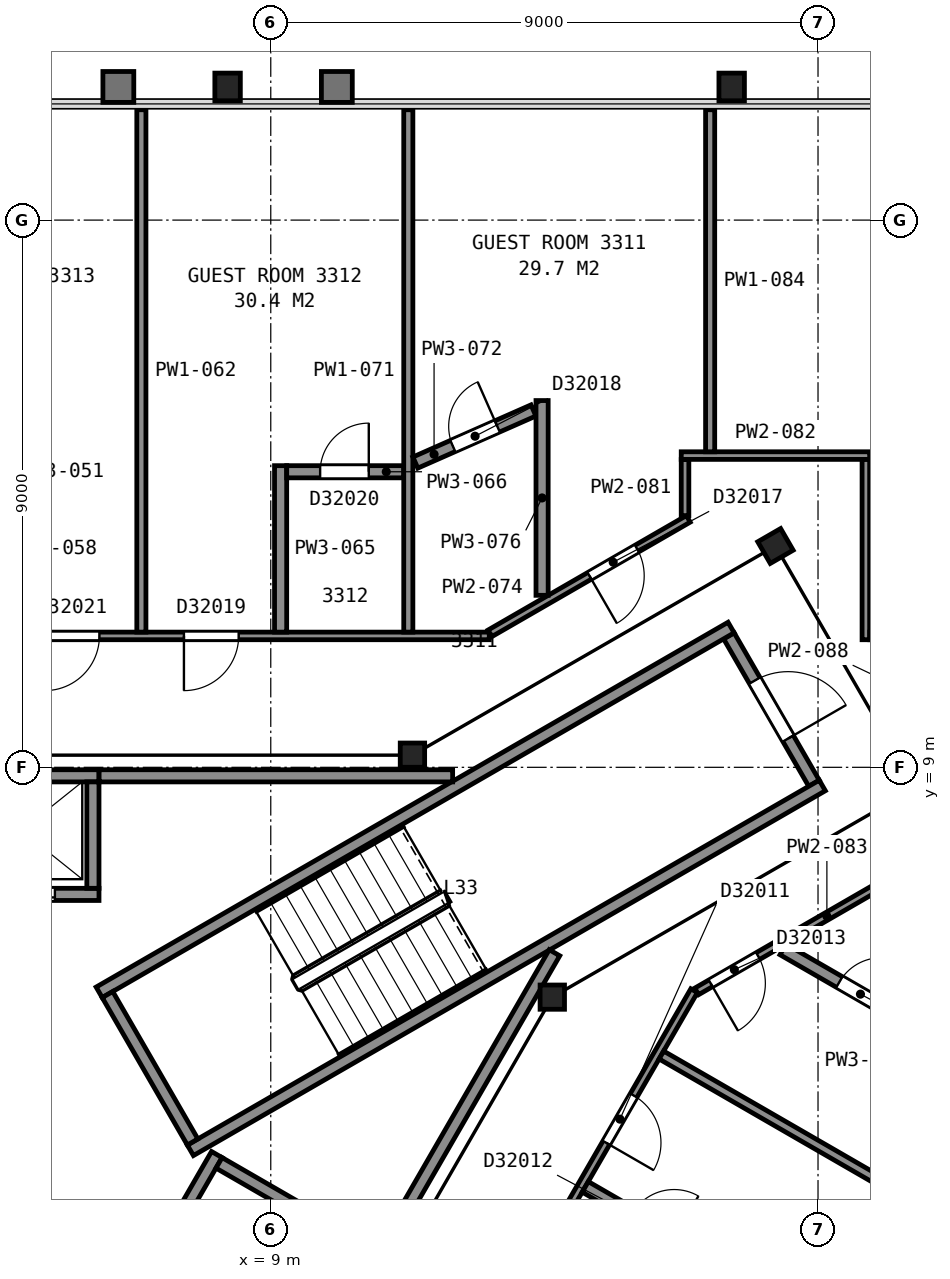
"""IFC4 building model, lengths in metres.
Left out: names, types, materials, properties, quantities, classifications, styles, units other than length and angle.
Written with IfcOpenShell. Run it as: python <this file> out.ifc"""

import sys

from ifc_helpers import new_model, si_unit, direction, frame, frame_2d, origin, origin_2d, place, context, subcontext, project, spatial, rectangle, i_section, extrude, element, fill, save


model = new_model("IFC4")
c1 = context("Model", 3, precision=1e-05, world=origin(), true_north=direction((0.0, 1.0)))
c2 = subcontext(c1, "Body", "Model", "MODEL_VIEW")
j1 = project(units=[si_unit("LENGTHUNIT", "METRE"), si_unit("PLANEANGLEUNIT", "RADIAN")], contexts=[c1])
p1 = place(None, origin())
s1 = spatial("IfcSite", under=j1, at=p1, CompositionType="ELEMENT")
p2 = place(p1, origin())
s2 = spatial("IfcBuilding", under=s1, at=p2, CompositionType="ELEMENT")
p3 = place(p2, frame((0.0, 0.0, 136.0)))
s3 = spatial("IfcBuildingStorey", under=s2, at=p3, CompositionType="ELEMENT", Elevation=136.0)
for number, where, z_axis, x_axis in (
    (1, (16.58, 20.19, 0.0), (0.0, 0.0, 1.0), (1.0, 0.0, 0.0)),
    (2, (8.29, 20.19, 0.0), (0.0, 0.0, 1.0), (1.0, 0.0, 0.0)),
):
    element("IfcColumn", number, at=place(p3, frame(where, z_axis=z_axis, x_axis=x_axis)), inside=s3, PredefinedType="COLUMN", context=c2, shape_type="SweptSolid", body=[
        extrude(i_section(OverallWidth=0.419, OverallDepth=0.455, WebThickness=0.042, FlangeThickness=0.068, FilletRadius=0.015, at=origin_2d()), origin(), (0.0, 0.0, 1.0), 3.6),
    ])
p4 = place(p3, frame((13.63, 5.22, 0.0), z_axis=(0.0, 0.0, 1.0), x_axis=(1.0, 0.0, 0.0)))
e3 = element("IfcColumn", 3, at=p4, inside=s3, PredefinedType="COLUMN", context=c2, shape_type="SweptSolid", body=[
    extrude(i_section(OverallWidth=0.401, OverallDepth=0.399, WebThickness=0.025, FlangeThickness=0.04, FilletRadius=0.015, at=origin_2d()), origin(), (0.0, 0.0, 1.0), 3.6),
])
p5 = place(p3, frame((17.3, 12.64, 0.0), z_axis=(0.0, 0.0, 1.0), x_axis=(0.5, -0.866025403784, 0.0)))
e4 = element("IfcColumn", 4, at=p5, inside=s3, PredefinedType="COLUMN", context=c2, shape_type="SweptSolid", body=[
    extrude(i_section(OverallWidth=0.411, OverallDepth=0.434, WebThickness=0.036, FlangeThickness=0.057, FilletRadius=0.015, at=origin_2d()), origin(), (0.0, 0.0, 1.0), 3.6),
])
p6 = place(p3, frame((11.33, 9.2, 0.0), z_axis=(0.0, 0.0, 1.0), x_axis=(1.0, 0.0, 0.0)))
e5 = element("IfcColumn", 5, at=p6, inside=s3, PredefinedType="COLUMN", context=c2, shape_type="SweptSolid", body=[
    extrude(i_section(OverallWidth=0.401, OverallDepth=0.399, WebThickness=0.025, FlangeThickness=0.04, FilletRadius=0.015, at=origin_2d()), origin(), (0.0, 0.0, 1.0), 3.6),
])
p7 = place(p3, frame((17.934, 8.738, 0.0), z_axis=(0.0, 0.0, 1.0), x_axis=(-0.49998411664, 0.866034573852, 0.0)))
e6 = element("IfcWall", 6, at=p7, inside=s3, PredefinedType="PARTITIONING", context=c2, shape_type="SweptSolid", body=[
    extrude(rectangle(XDim=2.8, YDim=0.2, at=frame_2d((1.4, 0.0))), origin(), (0.0, 0.0, 1.0), 3.35),
])
p8 = place(p7, frame((0.85, 0.0, 0.0)))
e7 = element("IfcOpeningElement", 7, at=p8, cuts=e6, PredefinedType="OPENING", context=c2, shape_type="SweptSolid", body=[
    extrude(rectangle(XDim=1.1, YDim=2.1, at=frame_2d((0.55, 1.05))), frame((0.0, 0.11, 0.0), z_axis=(0.0, -1.0, 0.0), x_axis=(1.0, 0.0, 0.0)), (0.0, 0.0, 1.0), 0.22),
])
for number, where, z_axis, x_axis in (
    (8, (6.178, 5.299, 0.0), (0.0, 0.0, 1.0), (0.866, 0.5, 0.0)),
    (9, (7.678, 2.701, 0.0), (0.0, 0.0, 1.0), (0.866, 0.5, 0.0)),
):
    element("IfcWall", number, at=place(p3, frame(where, z_axis=z_axis, x_axis=x_axis)), inside=s3, PredefinedType="PARTITIONING", context=c2, shape_type="SweptSolid", body=[
        extrude(rectangle(XDim=12.0, YDim=0.2, at=frame_2d((6.0, 0.0))), origin(), (0.0, 0.0, 1.0), 3.35),
    ])
p9 = place(p3, frame((7.715, 2.838, 0.0), z_axis=(0.0, 0.0, 1.0), x_axis=(-0.500049511043, 0.865996816683, 0.0)))
e10 = element("IfcWall", 10, at=p9, inside=s3, PredefinedType="PARTITIONING", context=c2, shape_type="SweptSolid", body=[
    extrude(rectangle(XDim=2.8, YDim=0.2, at=frame_2d((1.4, 0.0))), origin(), (0.0, 0.0, 1.0), 3.35),
])
p10 = place(p3, frame((3.625, 6.91, 0.0), z_axis=(0.0, 0.0, 1.0), x_axis=(1.0, 0.0, 0.0)))
e11 = element("IfcWall", 11, at=p10, inside=s3, PredefinedType="PARTITIONING", context=c2, shape_type="SweptSolid", body=[
    extrude(rectangle(XDim=2.55, YDim=0.2, at=frame_2d((1.275, 0.0))), origin(), (0.0, 0.0, 1.0), 3.6),
])
p11 = place(p10, frame((0.725, 0.0, 0.0)))
e12 = element("IfcOpeningElement", 12, at=p11, cuts=e11, PredefinedType="OPENING", context=c2, shape_type="SweptSolid", body=[
    extrude(rectangle(XDim=1.1, YDim=2.1, at=frame_2d((0.55, 1.05))), frame((0.0, 0.11, 0.0), z_axis=(0.0, -1.0, 0.0), x_axis=(1.0, 0.0, 0.0)), (0.0, 0.0, 1.0), 0.22),
])
p12 = place(p3, frame((3.625, 8.86, 0.0), z_axis=(0.0, 0.0, 1.0), x_axis=(1.0, 0.0, 0.0)))
e13 = element("IfcWall", 13, at=p12, inside=s3, PredefinedType="PARTITIONING", context=c2, shape_type="SweptSolid", body=[
    extrude(rectangle(XDim=2.55, YDim=0.2, at=frame_2d((1.275, 0.0))), origin(), (0.0, 0.0, 1.0), 3.6),
])
p13 = place(p3, frame((5.663, -1.612, 0.0), z_axis=(0.0, 0.0, 1.0), x_axis=(0.49998122708, 0.866036242063, 0.0)))
e14 = element("IfcWall", 14, at=p13, inside=s3, PredefinedType="PARTITIONING", context=c2, shape_type="SweptSolid", body=[
    extrude(rectangle(XDim=4.9, YDim=0.2, at=frame_2d((2.45, 0.0))), origin(), (0.0, 0.0, 1.0), 3.6),
])
p14 = place(p3, frame((6.075, 7.01, 0.0), z_axis=(0.0, 0.0, 1.0), x_axis=(0.0, 1.0, 0.0)))
e15 = element("IfcWall", 15, at=p14, inside=s3, PredefinedType="PARTITIONING", context=c2, shape_type="SweptSolid", body=[
    extrude(rectangle(XDim=1.75, YDim=0.2, at=frame_2d((0.875, 0.0))), origin(), (0.0, 0.0, 1.0), 3.6),
])
p15 = place(p3, frame((9.665, 1.62, 0.0), z_axis=(0.0, 0.0, 1.0), x_axis=(-0.866002029911, 0.500040482552, 0.0)))
e16 = element("IfcWall", 16, at=p15, inside=s3, PredefinedType="PARTITIONING", context=c2, shape_type="SweptSolid", body=[
    extrude(rectangle(XDim=1.75, YDim=0.2, at=frame_2d((0.875, 0.0))), origin(), (0.0, 0.0, 1.0), 3.6),
])
p16 = place(p3, frame((6.177, 8.86, 0.0), z_axis=(0.0, 0.0, 1.0), x_axis=(1.0, 0.0, 0.0)))
e17 = element("IfcWall", 17, at=p16, inside=s3, PredefinedType="PARTITIONING", context=c2, shape_type="SweptSolid", body=[
    extrude(rectangle(XDim=5.814, YDim=0.2, at=frame_2d((2.907, 0.0))), origin(), (0.0, 0.0, 1.0), 3.35),
])
p17 = place(p3, frame((8.492, -3.012, 0.0), z_axis=(0.0, 0.0, 1.0), x_axis=(0.499972957231, 0.866041016371, 0.0)))
e18 = element("IfcWall", 18, at=p17, inside=s3, PredefinedType="PARTITIONING", context=c2, shape_type="SweptSolid", body=[
    extrude(rectangle(XDim=10.349, YDim=0.2, at=frame_2d((5.174, 0.0))), origin(), (0.0, 0.0, 1.0), 3.35),
])
p18 = place(p3, frame((-12.594, 11.161, 0.0), z_axis=(0.0, 0.0, 1.0), x_axis=(1.0, 0.0, 0.0)))
e19 = element("IfcWall", 19, at=p18, inside=s3, PredefinedType="PARTITIONING", context=c2, shape_type="SweptSolid", body=[
    extrude(rectangle(XDim=25.187, YDim=0.125, at=frame_2d((12.594, 0.0))), origin(), (0.0, 0.0, 1.0), 2.613),
])
p19 = place(p18, frame((20.166, 0.0, 0.0)))
e20 = element("IfcOpeningElement", 20, at=p19, cuts=e19, PredefinedType="OPENING", context=c2, shape_type="SweptSolid", body=[
    extrude(rectangle(XDim=0.9, YDim=2.1, at=frame_2d((0.45, 1.05))), frame((0.0, 0.073, 0.0), z_axis=(0.0, -1.0, 0.0), x_axis=(1.0, 0.0, 0.0)), (0.0, 0.0, 1.0), 0.145),
])
p20 = place(p18, frame((17.875, 0.0, 0.0)))
e21 = element("IfcOpeningElement", 21, at=p20, cuts=e19, PredefinedType="OPENING", context=c2, shape_type="SweptSolid", body=[
    extrude(rectangle(XDim=0.9, YDim=2.1, at=frame_2d((0.45, 1.05))), frame((0.0, 0.073, 0.0), z_axis=(0.0, -1.0, 0.0), x_axis=(1.0, 0.0, 0.0)), (0.0, 0.0, 1.0), 0.145),
])
p21 = place(p18, frame((11.062, 0.0, 0.0)))
e22 = element("IfcOpeningElement", 22, at=p21, cuts=e19, PredefinedType="OPENING", context=c2, shape_type="SweptSolid", body=[
    extrude(rectangle(XDim=0.9, YDim=2.1, at=frame_2d((0.45, 1.05))), frame((0.0, 0.073, 0.0), z_axis=(0.0, -1.0, 0.0), x_axis=(1.0, 0.0, 0.0)), (0.0, 0.0, 1.0), 0.145),
])
p22 = place(p18, frame((8.521, 0.0, 0.0)))
e23 = element("IfcOpeningElement", 23, at=p22, cuts=e19, PredefinedType="OPENING", context=c2, shape_type="SweptSolid", body=[
    extrude(rectangle(XDim=0.9, YDim=2.1, at=frame_2d((0.45, 1.05))), frame((0.0, 0.073, 0.0), z_axis=(0.0, -1.0, 0.0), x_axis=(1.0, 0.0, 0.0)), (0.0, 0.0, 1.0), 0.145),
])
p23 = place(p18, frame((2.031, 0.0, 0.0)))
e24 = element("IfcOpeningElement", 24, at=p23, cuts=e19, PredefinedType="OPENING", context=c2, shape_type="SweptSolid", body=[
    extrude(rectangle(XDim=0.9, YDim=2.1, at=frame_2d((0.45, 1.05))), frame((0.0, 0.073, 0.0), z_axis=(0.0, -1.0, 0.0), x_axis=(1.0, 0.0, 0.0)), (0.0, 0.0, 1.0), 0.145),
])
p24 = place(p3, frame((15.962, 5.326, 0.0), z_axis=(0.0, 0.0, 1.0), x_axis=(-0.499992829944, -0.866029543379, 0.0)))
e25 = element("IfcWall", 25, at=p24, inside=s3, PredefinedType="PARTITIONING", context=c2, shape_type="SweptSolid", body=[
    extrude(rectangle(XDim=24.413, YDim=0.125, at=frame_2d((12.207, 0.0))), origin(), (0.0, 0.0, 1.0), 2.613),
])
p25 = place(p24, frame((21.258, 0.0, 0.0)))
e26 = element("IfcOpeningElement", 26, at=p25, cuts=e25, PredefinedType="OPENING", context=c2, shape_type="SweptSolid", body=[
    extrude(rectangle(XDim=0.9, YDim=2.1, at=frame_2d((0.45, 1.05))), frame((0.0, 0.073, 0.0), z_axis=(0.0, -1.0, 0.0), x_axis=(1.0, 0.0, 0.0)), (0.0, 0.0, 1.0), 0.145),
])
p26 = place(p24, frame((18.502, 0.0, 0.0)))
e27 = element("IfcOpeningElement", 27, at=p26, cuts=e25, PredefinedType="OPENING", context=c2, shape_type="SweptSolid", body=[
    extrude(rectangle(XDim=0.9, YDim=2.1, at=frame_2d((0.45, 1.05))), frame((0.0, 0.073, 0.0), z_axis=(0.0, -1.0, 0.0), x_axis=(1.0, 0.0, 0.0)), (0.0, 0.0, 1.0), 0.145),
])
p27 = place(p24, frame((11.799, 0.0, 0.0)))
e28 = element("IfcOpeningElement", 28, at=p27, cuts=e25, PredefinedType="OPENING", context=c2, shape_type="SweptSolid", body=[
    extrude(rectangle(XDim=0.9, YDim=2.1, at=frame_2d((0.45, 1.05))), frame((0.0, 0.073, 0.0), z_axis=(0.0, -1.0, 0.0), x_axis=(1.0, 0.0, 0.0)), (0.0, 0.0, 1.0), 0.145),
])
p28 = place(p24, frame((9.043, 0.0, 0.0)))
e29 = element("IfcOpeningElement", 29, at=p28, cuts=e25, PredefinedType="OPENING", context=c2, shape_type="SweptSolid", body=[
    extrude(rectangle(XDim=0.9, YDim=2.1, at=frame_2d((0.45, 1.05))), frame((0.0, 0.073, 0.0), z_axis=(0.0, -1.0, 0.0), x_axis=(1.0, 0.0, 0.0)), (0.0, 0.0, 1.0), 0.145),
])
p29 = place(p24, frame((1.99, 0.0, 0.0)))
e30 = element("IfcOpeningElement", 30, at=p29, cuts=e25, PredefinedType="OPENING", context=c2, shape_type="SweptSolid", body=[
    extrude(rectangle(XDim=0.9, YDim=2.1, at=frame_2d((0.45, 1.05))), frame((0.0, 0.073, 0.0), z_axis=(0.0, -1.0, 0.0), x_axis=(1.0, 0.0, 0.0)), (0.0, 0.0, 1.0), 0.145),
])
p30 = place(p3, frame((6.872, 11.223, 0.0), z_axis=(0.0, 0.0, 1.0), x_axis=(0.0, 1.0, 0.0)))
e31 = element("IfcWall", 31, at=p30, inside=s3, PredefinedType="PARTITIONING", context=c2, shape_type="SweptSolid", body=[
    extrude(rectangle(XDim=8.592, YDim=0.15, at=frame_2d((4.296, 0.0))), origin(), (0.0, 0.0, 1.0), 2.613),
])
p31 = place(p3, frame((9.162, 11.223, 0.0), z_axis=(0.0, 0.0, 1.0), x_axis=(0.0, 1.0, 0.0)))
e32 = element("IfcWall", 32, at=p31, inside=s3, PredefinedType="PARTITIONING", context=c2, shape_type="SweptSolid", body=[
    extrude(rectangle(XDim=2.738, YDim=0.2, at=frame_2d((1.369, 0.0))), origin(), (0.0, 0.0, 1.0), 2.613),
])
p32 = place(p3, frame((11.187, 13.861, 0.0), z_axis=(0.0, 0.0, 1.0), x_axis=(-1.0, 0.0, 0.0)))
e33 = element("IfcWall", 33, at=p32, inside=s3, PredefinedType="PARTITIONING", context=c2, shape_type="SweptSolid", body=[
    extrude(rectangle(XDim=1.925, YDim=0.2, at=frame_2d((0.962, 0.0))), origin(), (0.0, 0.0, 1.0), 2.613),
])
p33 = place(p32, frame((0.575, 0.0, 0.0)))
e34 = element("IfcOpeningElement", 34, at=p33, cuts=e33, PredefinedType="OPENING", context=c2, shape_type="SweptSolid", body=[
    extrude(rectangle(XDim=0.8, YDim=2.1, at=frame_2d((0.4, 1.05))), frame((0.0, 0.11, 0.0), z_axis=(0.0, -1.0, 0.0), x_axis=(1.0, 0.0, 0.0)), (0.0, 0.0, 1.0), 0.22),
])
p34 = place(p3, frame((11.262, 11.223, 0.0), z_axis=(0.0, 0.0, 1.0), x_axis=(0.0, 1.0, 0.0)))
e35 = element("IfcWall", 35, at=p34, inside=s3, PredefinedType="PARTITIONING", context=c2, shape_type="SweptSolid", body=[
    extrude(rectangle(XDim=8.592, YDim=0.15, at=frame_2d((4.296, 0.0))), origin(), (0.0, 0.0, 1.0), 2.613),
])
p35 = place(p3, frame((13.32, 14.869, 0.0), z_axis=(0.0, 0.0, 1.0), x_axis=(-0.914870345188, -0.403747757263, 0.0)))
e36 = element("IfcWall", 36, at=p35, inside=s3, PredefinedType="PARTITIONING", context=c2, shape_type="SweptSolid", body=[
    extrude(rectangle(XDim=2.124, YDim=0.2, at=frame_2d((1.062, 0.0))), origin(), (0.0, 0.0, 1.0), 2.613),
])
p36 = place(p35, frame((0.65, 0.0, 0.0)))
e37 = element("IfcOpeningElement", 37, at=p36, cuts=e36, PredefinedType="OPENING", context=c2, shape_type="SweptSolid", body=[
    extrude(rectangle(XDim=0.8, YDim=2.1, at=frame_2d((0.4, 1.05))), frame((0.0, 0.11, 0.0), z_axis=(0.0, -1.0, 0.0), x_axis=(1.0, 0.0, 0.0)), (0.0, 0.0, 1.0), 0.22),
])
p37 = place(p3, frame((12.605, 11.203, 0.0), z_axis=(0.0, 0.0, 1.0), x_axis=(0.866113281362, 0.499847760672, 0.0)))
e38 = element("IfcWall", 38, at=p37, inside=s3, PredefinedType="PARTITIONING", context=c2, shape_type="SweptSolid", body=[
    extrude(rectangle(XDim=3.767, YDim=0.125, at=frame_2d((1.883, 0.0))), origin(), (0.0, 0.0, 1.0), 2.613),
])
p38 = place(p37, frame((1.89, 0.0, 0.0)))
e39 = element("IfcOpeningElement", 39, at=p38, cuts=e38, PredefinedType="OPENING", context=c2, shape_type="SweptSolid", body=[
    extrude(rectangle(XDim=0.9, YDim=2.1, at=frame_2d((0.45, 1.05))), frame((0.0, 0.073, 0.0), z_axis=(0.0, -1.0, 0.0), x_axis=(1.0, 0.0, 0.0)), (0.0, 0.0, 1.0), 0.145),
])
p39 = place(p3, frame((13.462, 11.829, 0.0), z_axis=(0.0, 0.0, 1.0), x_axis=(0.0, 1.0, 0.0)))
e40 = element("IfcWall", 40, at=p39, inside=s3, PredefinedType="PARTITIONING", context=c2, shape_type="SweptSolid", body=[
    extrude(rectangle(XDim=3.203, YDim=0.2, at=frame_2d((1.602, 0.0))), origin(), (0.0, 0.0, 1.0), 2.613),
])
p40 = place(p3, frame((16.542, 0.731, 0.0), z_axis=(0.0, 0.0, 1.0), x_axis=(-0.86596722502, 0.50010075504, 0.0)))
e41 = element("IfcWall", 41, at=p40, inside=s3, PredefinedType="PARTITIONING", context=c2, shape_type="SweptSolid", body=[
    extrude(rectangle(XDim=2.737, YDim=0.2, at=frame_2d((1.369, 0.0))), origin(), (0.0, 0.0, 1.0), 2.613),
])
p41 = place(p40, frame((1.05, 0.0, 0.0)))
e42 = element("IfcOpeningElement", 42, at=p41, cuts=e41, PredefinedType="OPENING", context=c2, shape_type="SweptSolid", body=[
    extrude(rectangle(XDim=0.8, YDim=2.1, at=frame_2d((0.4, 1.05))), frame((0.0, 0.11, 0.0), z_axis=(0.0, -1.0, 0.0), x_axis=(1.0, 0.0, 0.0)), (0.0, 0.0, 1.0), 0.22),
])
p42 = place(p3, frame((15.424, 4.268, 0.0), z_axis=(0.0, 0.0, 1.0), x_axis=(0.866022320763, -0.500005339912, 0.0)))
e43 = element("IfcWall", 43, at=p42, inside=s3, PredefinedType="PARTITIONING", context=c2, shape_type="SweptSolid", body=[
    extrude(rectangle(XDim=8.591, YDim=0.15, at=frame_2d((4.296, 0.0))), origin(), (0.0, 0.0, 1.0), 2.613),
])
p43 = place(p3, frame((15.813, 13.14, 0.0), z_axis=(0.0, 0.0, 1.0), x_axis=(0.0, 1.0, 0.0)))
e44 = element("IfcWall", 44, at=p43, inside=s3, PredefinedType="PARTITIONING", context=c2, shape_type="SweptSolid", body=[
    extrude(rectangle(XDim=0.922, YDim=0.125, at=frame_2d((0.461, 0.0))), origin(), (0.0, 0.0, 1.0), 2.613),
])
p44 = place(p3, frame((15.75, 14.127, 0.0), z_axis=(0.0, 0.0, 1.0), x_axis=(1.0, 0.0, 0.0)))
e45 = element("IfcWall", 45, at=p44, inside=s3, PredefinedType="PARTITIONING", context=c2, shape_type="SweptSolid", body=[
    extrude(rectangle(XDim=3.099, YDim=0.125, at=frame_2d((1.55, 0.0))), origin(), (0.0, 0.0, 1.0), 2.613),
])
p45 = place(p3, frame((19.278, 7.204, 0.0), z_axis=(0.0, 0.0, 1.0), x_axis=(-0.866028547684, -0.499994554566, 0.0)))
e46 = element("IfcWall", 46, at=p45, inside=s3, PredefinedType="PARTITIONING", context=c2, shape_type="SweptSolid", body=[
    extrude(rectangle(XDim=3.78, YDim=0.125, at=frame_2d((1.89, 0.0))), origin(), (0.0, 0.0, 1.0), 2.613),
])
p46 = place(p45, frame((2.615, 0.0, 0.0)))
e47 = element("IfcOpeningElement", 47, at=p46, cuts=e46, PredefinedType="OPENING", context=c2, shape_type="SweptSolid", body=[
    extrude(rectangle(XDim=0.9, YDim=2.1, at=frame_2d((0.45, 1.05))), frame((0.0, 0.073, 0.0), z_axis=(0.0, -1.0, 0.0), x_axis=(1.0, 0.0, 0.0)), (0.0, 0.0, 1.0), 0.145),
])
p47 = place(p3, frame((16.226, 14.189, 0.0), z_axis=(0.0, 0.0, 1.0), x_axis=(0.0, 1.0, 0.0)))
e48 = element("IfcWall", 48, at=p47, inside=s3, PredefinedType="PARTITIONING", context=c2, shape_type="SweptSolid", body=[
    extrude(rectangle(XDim=5.625, YDim=0.15, at=frame_2d((2.813, 0.0))), origin(), (0.0, 0.0, 1.0), 2.613),
])
p48 = place(p3, frame((17.425, 6.004, 0.0), z_axis=(0.0, 0.0, 1.0), x_axis=(0.866145753309, -0.499791490549, 0.0)))
e49 = element("IfcWall", 49, at=p48, inside=s3, PredefinedType="PARTITIONING", context=c2, shape_type="SweptSolid", body=[
    extrude(rectangle(XDim=3.163, YDim=0.2, at=frame_2d((1.582, 0.0))), origin(), (0.0, 0.0, 1.0), 2.613),
])
p49 = place(p48, frame((1.07, 0.0, 0.0)))
e50 = element("IfcOpeningElement", 50, at=p49, cuts=e49, PredefinedType="OPENING", context=c2, shape_type="SweptSolid", body=[
    extrude(rectangle(XDim=0.8, YDim=2.1, at=frame_2d((0.4, 1.05))), frame((0.0, 0.11, 0.0), z_axis=(0.0, -1.0, 0.0), x_axis=(1.0, 0.0, 0.0)), (0.0, 0.0, 1.0), 0.22),
])
p50 = place(p3, frame((18.787, 11.098, 0.0), z_axis=(0.0, 0.0, 1.0), x_axis=(0.0, 1.0, 0.0)))
e51 = element("IfcWall", 51, at=p50, inside=s3, PredefinedType="PARTITIONING", context=c2, shape_type="SweptSolid", body=[
    extrude(rectangle(XDim=2.964, YDim=0.125, at=frame_2d((1.482, 0.0))), origin(), (0.0, 0.0, 1.0), 2.613),
])
p51 = place(p8, origin())
e52 = element("IfcDoor", 52, at=p51, inside=s3, OperationType="SINGLE_SWING_LEFT", PredefinedType="DOOR", context=c2, shape_type="SweptSolid", body=[
    extrude(rectangle(XDim=1.1, YDim=2.1, at=frame_2d((0.55, 1.05))), frame((0.0, 0.025, 0.0), z_axis=(0.0, -1.0, 0.0), x_axis=(1.0, 0.0, 0.0)), (0.0, 0.0, 1.0), 0.05),
])
fill(e7, e52)
p52 = place(p11, origin())
e53 = element("IfcDoor", 53, at=p52, inside=s3, OperationType="SLIDING_TO_LEFT", PredefinedType="DOOR", context=c2, shape_type="SweptSolid", body=[
    extrude(rectangle(XDim=1.1, YDim=2.1, at=frame_2d((0.55, 1.05))), frame((0.0, 0.025, 0.0), z_axis=(0.0, -1.0, 0.0), x_axis=(1.0, 0.0, 0.0)), (0.0, 0.0, 1.0), 0.05),
])
fill(e12, e53)
p53 = place(p19, origin())
e54 = element("IfcDoor", 54, at=p53, inside=s3, OperationType="SINGLE_SWING_LEFT", PredefinedType="DOOR", context=c2, shape_type="SweptSolid", body=[
    extrude(rectangle(XDim=0.9, YDim=2.1, at=frame_2d((0.45, 1.05))), frame((0.0, 0.025, 0.0), z_axis=(0.0, -1.0, 0.0), x_axis=(1.0, 0.0, 0.0)), (0.0, 0.0, 1.0), 0.05),
])
fill(e20, e54)
p54 = place(p20, origin())
e55 = element("IfcDoor", 55, at=p54, inside=s3, OperationType="SINGLE_SWING_LEFT", PredefinedType="DOOR", context=c2, shape_type="SweptSolid", body=[
    extrude(rectangle(XDim=0.9, YDim=2.1, at=frame_2d((0.45, 1.05))), frame((0.0, 0.025, 0.0), z_axis=(0.0, -1.0, 0.0), x_axis=(1.0, 0.0, 0.0)), (0.0, 0.0, 1.0), 0.05),
])
fill(e21, e55)
p55 = place(p29, origin())
e56 = element("IfcDoor", 56, at=p55, inside=s3, OperationType="SINGLE_SWING_RIGHT", PredefinedType="DOOR", context=c2, shape_type="SweptSolid", body=[
    extrude(rectangle(XDim=0.9, YDim=2.1, at=frame_2d((0.45, 1.05))), frame((0.0, 0.025, 0.0), z_axis=(0.0, -1.0, 0.0), x_axis=(1.0, 0.0, 0.0)), (0.0, 0.0, 1.0), 0.05),
])
fill(e30, e56)
p56 = place(p33, origin())
e57 = element("IfcDoor", 57, at=p56, inside=s3, OperationType="SINGLE_SWING_LEFT", PredefinedType="DOOR", context=c2, shape_type="SweptSolid", body=[
    extrude(rectangle(XDim=0.8, YDim=2.1, at=frame_2d((0.4, 1.05))), frame((0.0, 0.025, 0.0), z_axis=(0.0, -1.0, 0.0), x_axis=(1.0, 0.0, 0.0)), (0.0, 0.0, 1.0), 0.05),
])
fill(e34, e57)
p57 = place(p36, origin())
e58 = element("IfcDoor", 58, at=p57, inside=s3, OperationType="SINGLE_SWING_LEFT", PredefinedType="DOOR", context=c2, shape_type="SweptSolid", body=[
    extrude(rectangle(XDim=0.8, YDim=2.1, at=frame_2d((0.4, 1.05))), frame((0.0, 0.025, 0.0), z_axis=(0.0, -1.0, 0.0), x_axis=(1.0, 0.0, 0.0)), (0.0, 0.0, 1.0), 0.05),
])
fill(e37, e58)
p58 = place(p38, origin())
e59 = element("IfcDoor", 59, at=p58, inside=s3, OperationType="SINGLE_SWING_LEFT", PredefinedType="DOOR", context=c2, shape_type="SweptSolid", body=[
    extrude(rectangle(XDim=0.9, YDim=2.1, at=frame_2d((0.45, 1.05))), frame((0.0, 0.025, 0.0), z_axis=(0.0, -1.0, 0.0), x_axis=(1.0, 0.0, 0.0)), (0.0, 0.0, 1.0), 0.05),
])
fill(e39, e59)
p59 = place(p46, origin())
e60 = element("IfcDoor", 60, at=p59, inside=s3, OperationType="SINGLE_SWING_RIGHT", PredefinedType="DOOR", context=c2, shape_type="SweptSolid", body=[
    extrude(rectangle(XDim=0.9, YDim=2.1, at=frame_2d((0.45, 1.05))), frame((0.0, 0.025, 0.0), z_axis=(0.0, -1.0, 0.0), x_axis=(1.0, 0.0, 0.0)), (0.0, 0.0, 1.0), 0.05),
])
fill(e47, e60)
p60 = place(p49, origin())
e61 = element("IfcDoor", 61, at=p60, inside=s3, OperationType="SINGLE_SWING_RIGHT", PredefinedType="DOOR", context=c2, shape_type="SweptSolid", body=[
    extrude(rectangle(XDim=0.8, YDim=2.1, at=frame_2d((0.4, 1.05))), frame((0.0, 0.025, 0.0), z_axis=(0.0, -1.0, 0.0), x_axis=(1.0, 0.0, 0.0)), (0.0, 0.0, 1.0), 0.05),
])
fill(e50, e61)
save(model, sys.argv[1])
